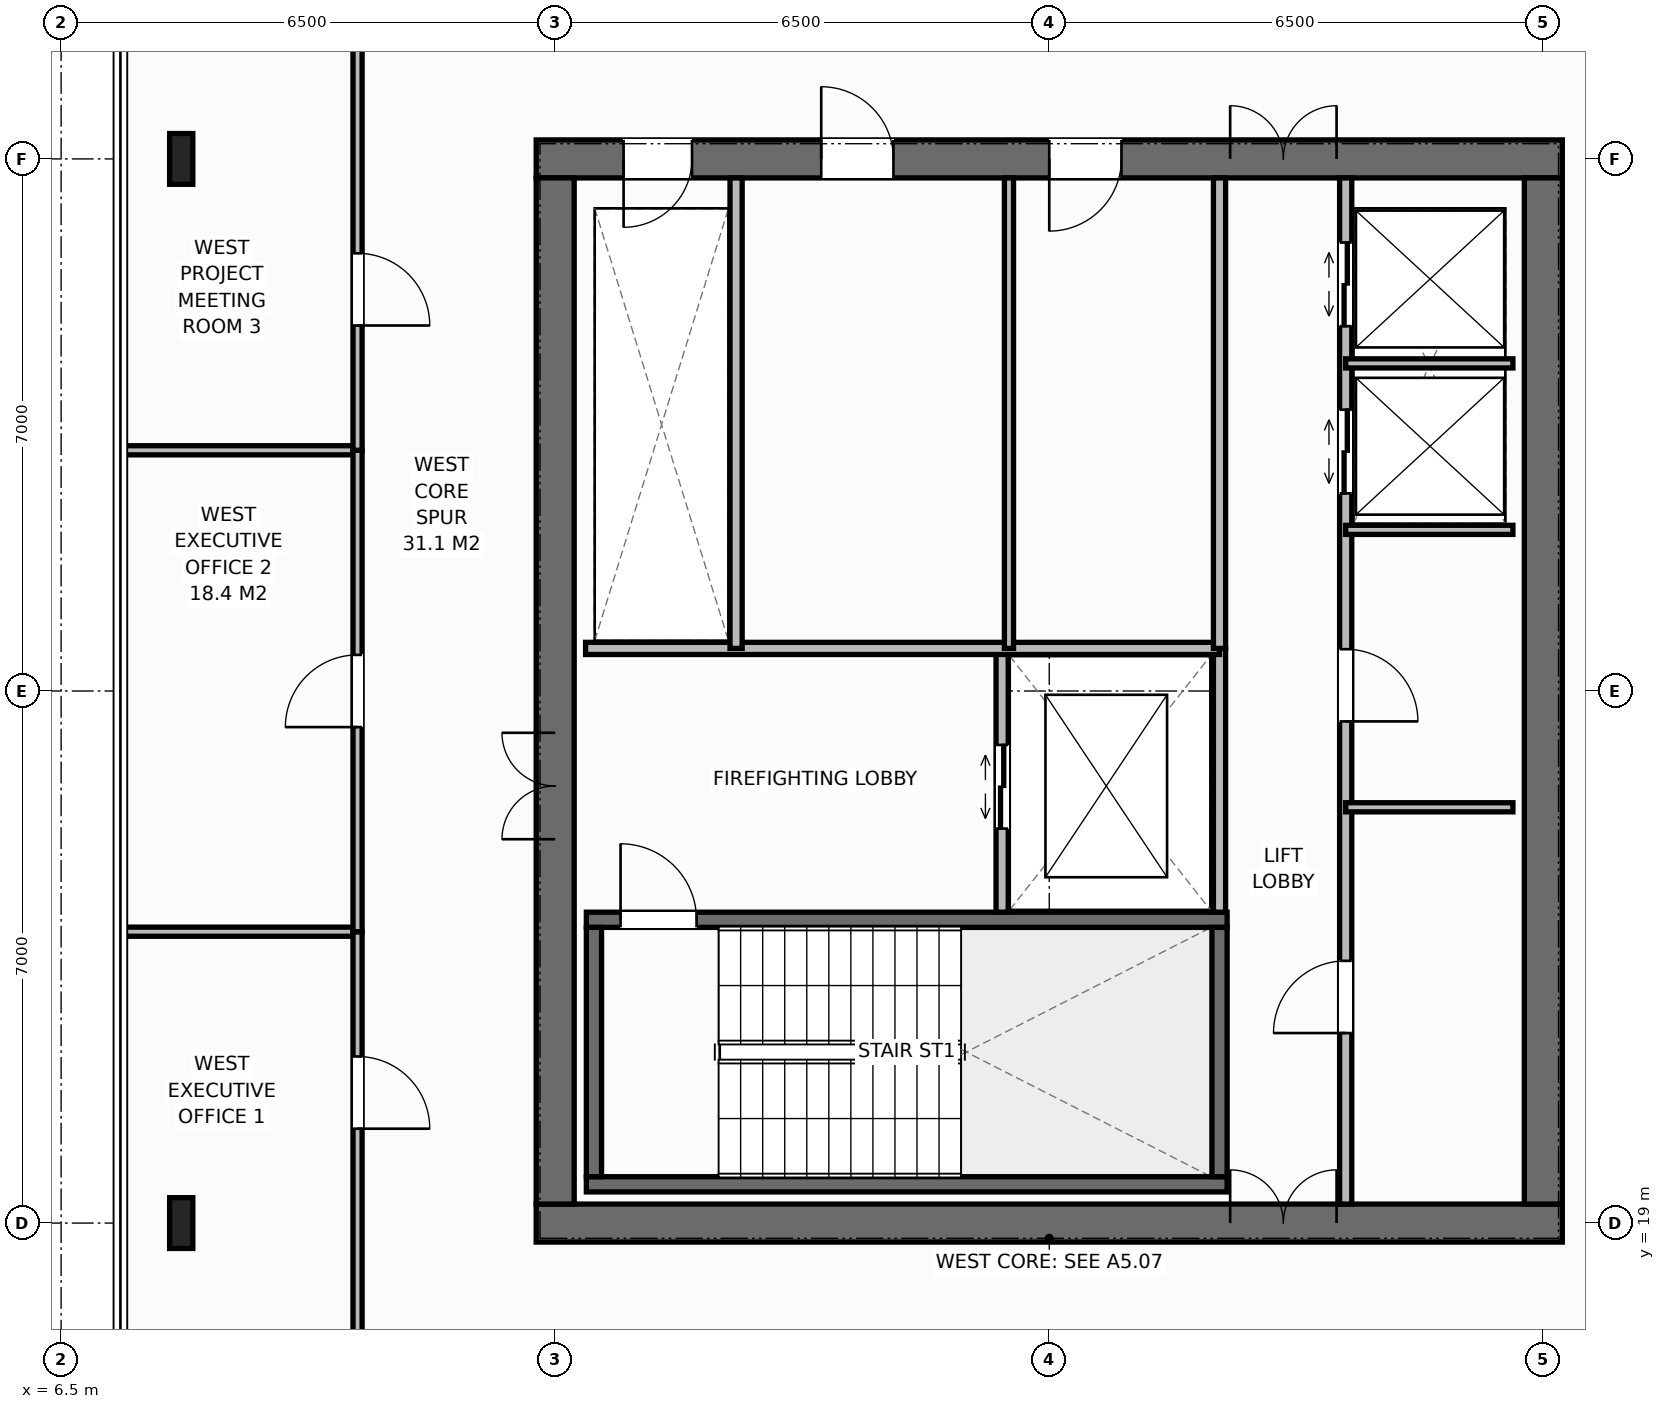
"""IFC4 building model, lengths in metres.
Left out: names, types, materials, properties, quantities, classifications, styles, units other than length and angle.
Written with IfcOpenShell. Run it as: python <this file> out.ifc"""

import sys

from ifc_helpers import new_model, si_unit, direction, frame, frame_2d, origin, origin_2d, place, context, subcontext, project, spatial, rectangle, i_section, extrude, element, fill, save


model = new_model("IFC4")
c1 = context("Model", 3, precision=1e-05, world=origin(), true_north=direction((0.0, 1.0)))
c2 = subcontext(c1, "Body", "Model", "MODEL_VIEW")
j1 = project(units=[si_unit("LENGTHUNIT", "METRE"), si_unit("PLANEANGLEUNIT", "RADIAN")], contexts=[c1])
p1 = place(None, origin())
s1 = spatial("IfcSite", under=j1, at=p1, CompositionType="ELEMENT")
p2 = place(p1, origin())
s2 = spatial("IfcBuilding", under=s1, at=p2, CompositionType="ELEMENT")
p3 = place(p2, frame((0.0, 0.0, 294.4)))
s3 = spatial("IfcBuildingStorey", under=s2, at=p3, CompositionType="ELEMENT", Elevation=294.4)
p4 = place(p3, frame((12.75, 19.0, 0.0), z_axis=(0.0, 0.0, 1.0), x_axis=(1.0, 0.0, 0.0)))
e1 = element("IfcWall", 1, at=p4, inside=s3, PredefinedType="SHEAR", context=c2, shape_type="SweptSolid", body=[
    extrude(rectangle(XDim=13.5, YDim=0.5, at=frame_2d((6.75, 0.0))), origin(), (0.0, 0.0, 1.0), 4.0),
])
p5 = place(p4, frame((9.13, 0.0, 0.0)))
e2 = element("IfcOpeningElement", 2, at=p5, cuts=e1, PredefinedType="OPENING", context=c2, shape_type="SweptSolid", body=[
    extrude(rectangle(XDim=1.4, YDim=2.2, at=frame_2d((0.7, 1.1))), frame((0.0, 0.26, 0.0), z_axis=(0.0, -1.0, 0.0), x_axis=(1.0, 0.0, 0.0)), (0.0, 0.0, 1.0), 0.52),
])
p6 = place(p3, frame((12.75, 33.0, 0.0), z_axis=(0.0, 0.0, 1.0), x_axis=(1.0, 0.0, 0.0)))
e3 = element("IfcWall", 3, at=p6, inside=s3, PredefinedType="SHEAR", context=c2, shape_type="SweptSolid", body=[
    extrude(rectangle(XDim=13.5, YDim=0.5, at=frame_2d((6.75, 0.0))), origin(), (0.0, 0.0, 1.0), 4.0),
])
p7 = place(p6, frame((1.15, 0.0, 0.0)))
e4 = element("IfcOpeningElement", 4, at=p7, cuts=e3, PredefinedType="OPENING", context=c2, shape_type="SweptSolid", body=[
    extrude(rectangle(XDim=0.9, YDim=2.15, at=frame_2d((0.45, 1.075))), frame((0.0, 0.26, 0.0), z_axis=(0.0, -1.0, 0.0), x_axis=(1.0, 0.0, 0.0)), (0.0, 0.0, 1.0), 0.52),
])
p8 = place(p6, frame((3.75, 0.0, 0.0)))
e5 = element("IfcOpeningElement", 5, at=p8, cuts=e3, PredefinedType="OPENING", context=c2, shape_type="SweptSolid", body=[
    extrude(rectangle(XDim=0.95, YDim=2.15, at=frame_2d((0.475, 1.075))), frame((0.0, 0.26, 0.0), z_axis=(0.0, -1.0, 0.0), x_axis=(1.0, 0.0, 0.0)), (0.0, 0.0, 1.0), 0.52),
])
p9 = place(p6, frame((6.75, 0.0, 0.0)))
e6 = element("IfcOpeningElement", 6, at=p9, cuts=e3, PredefinedType="OPENING", context=c2, shape_type="SweptSolid", body=[
    extrude(rectangle(XDim=0.95, YDim=2.15, at=frame_2d((0.475, 1.075))), frame((0.0, 0.26, 0.0), z_axis=(0.0, -1.0, 0.0), x_axis=(1.0, 0.0, 0.0)), (0.0, 0.0, 1.0), 0.52),
])
p10 = place(p6, frame((9.13, 0.0, 0.0)))
e7 = element("IfcOpeningElement", 7, at=p10, cuts=e3, PredefinedType="OPENING", context=c2, shape_type="SweptSolid", body=[
    extrude(rectangle(XDim=1.4, YDim=2.2, at=frame_2d((0.7, 1.1))), frame((0.0, 0.26, 0.0), z_axis=(0.0, -1.0, 0.0), x_axis=(1.0, 0.0, 0.0)), (0.0, 0.0, 1.0), 0.52),
])
p11 = place(p3, frame((13.0, 19.25, 0.0), z_axis=(0.0, 0.0, 1.0), x_axis=(0.0, 1.0, 0.0)))
e8 = element("IfcWall", 8, at=p11, inside=s3, PredefinedType="SHEAR", context=c2, shape_type="SweptSolid", body=[
    extrude(rectangle(XDim=13.5, YDim=0.5, at=frame_2d((6.75, 0.0))), origin(), (0.0, 0.0, 1.0), 4.0),
])
p12 = place(p11, frame((4.8, 0.0, 0.0)))
e9 = element("IfcOpeningElement", 9, at=p12, cuts=e8, PredefinedType="OPENING", context=c2, shape_type="SweptSolid", body=[
    extrude(rectangle(XDim=1.4, YDim=2.2, at=frame_2d((0.7, 1.1))), frame((0.0, 0.26, 0.0), z_axis=(0.0, -1.0, 0.0), x_axis=(1.0, 0.0, 0.0)), (0.0, 0.0, 1.0), 0.52),
])
p13 = place(p3, frame((26.0, 19.25, 0.0), z_axis=(0.0, 0.0, 1.0), x_axis=(0.0, 1.0, 0.0)))
e10 = element("IfcWall", 10, at=p13, inside=s3, PredefinedType="SHEAR", context=c2, shape_type="SweptSolid", body=[
    extrude(rectangle(XDim=13.5, YDim=0.5, at=frame_2d((6.75, 0.0))), origin(), (0.0, 0.0, 1.0), 4.0),
])
p14 = place(p3, frame((13.41, 19.51, 0.0), z_axis=(0.0, 0.0, 1.0), x_axis=(1.0, 0.0, 0.0)))
e11 = element("IfcWall", 11, at=p14, inside=s3, PredefinedType="SHEAR", context=c2, shape_type="SweptSolid", body=[
    extrude(rectangle(XDim=8.43, YDim=0.2, at=frame_2d((4.215, 0.0))), origin(), (0.0, 0.0, 1.0), 4.0),
])
p15 = place(p3, frame((13.41, 22.99, 0.0), z_axis=(0.0, 0.0, 1.0), x_axis=(1.0, 0.0, 0.0)))
e12 = element("IfcWall", 12, at=p15, inside=s3, PredefinedType="SHEAR", context=c2, shape_type="SweptSolid", body=[
    extrude(rectangle(XDim=8.43, YDim=0.2, at=frame_2d((4.215, 0.0))), origin(), (0.0, 0.0, 1.0), 4.0),
])
p16 = place(p15, frame((0.45, 0.0, 0.0)))
e13 = element("IfcOpeningElement", 13, at=p16, cuts=e12, PredefinedType="OPENING", context=c2, shape_type="SweptSolid", body=[
    extrude(rectangle(XDim=1.0, YDim=2.15, at=frame_2d((0.5, 1.075))), frame((0.0, 0.11, 0.0), z_axis=(0.0, -1.0, 0.0), x_axis=(1.0, 0.0, 0.0)), (0.0, 0.0, 1.0), 0.22),
])
for number, where, z_axis, x_axis in (
    (14, (13.51, 19.61, 0.0), (0.0, 0.0, 1.0), (0.0, 1.0, 0.0)),
    (15, (21.74, 19.61, 0.0), (0.0, 0.0, 1.0), (0.0, 1.0, 0.0)),
):
    element("IfcWall", number, at=place(p3, frame(where, z_axis=z_axis, x_axis=x_axis)), inside=s3, PredefinedType="SHEAR", context=c2, shape_type="SweptSolid", body=[
        extrude(rectangle(XDim=3.28, YDim=0.2, at=frame_2d((1.64, 0.0))), origin(), (0.0, 0.0, 1.0), 4.0),
    ])
for number, where, z_axis, x_axis in (
    (16, (8.08, 19.0, 0.0), (0.0, 0.0, 1.0), (1.0, 0.0, 0.0)),
    (17, (8.08, 33.0, 0.0), (0.0, 0.0, 1.0), (1.0, 0.0, 0.0)),
):
    element("IfcColumn", number, at=place(p3, frame(where, z_axis=z_axis, x_axis=x_axis)), inside=s3, PredefinedType="COLUMN", context=c2, shape_type="SweptSolid", body=[
        extrude(i_section(OverallWidth=0.305, OverallDepth=0.668, WebThickness=0.021, FlangeThickness=0.04, at=origin_2d()), origin(), (0.0, 0.0, 1.0), 4.0),
    ])
p17 = place(p3, frame((21.74, 23.09, 0.0), z_axis=(0.0, 0.0, 1.0), x_axis=(0.0, 1.0, 0.0)))
e18 = element("IfcWall", 18, at=p17, inside=s3, PredefinedType="STANDARD", context=c2, shape_type="SweptSolid", body=[
    extrude(rectangle(XDim=3.47, YDim=0.16, at=frame_2d((1.735, 0.0))), origin(), (0.0, 0.0, 1.0), 3.788),
])
p18 = place(p3, frame((18.88, 23.09, 0.0), z_axis=(0.0, 0.0, 1.0), x_axis=(0.0, 1.0, 0.0)))
e19 = element("IfcWall", 19, at=p18, inside=s3, PredefinedType="STANDARD", context=c2, shape_type="SweptSolid", body=[
    extrude(rectangle(XDim=3.47, YDim=0.16, at=frame_2d((1.735, 0.0))), origin(), (0.0, 0.0, 1.0), 3.788),
])
p19 = place(p18, frame((1.1, 0.0, 0.0)))
e20 = element("IfcOpeningElement", 20, at=p19, cuts=e19, PredefinedType="OPENING", context=c2, shape_type="SweptSolid", body=[
    extrude(rectangle(XDim=1.1, YDim=2.2, at=frame_2d((0.55, 1.1))), frame((0.0, 0.09, 0.0), z_axis=(0.0, -1.0, 0.0), x_axis=(1.0, 0.0, 0.0)), (0.0, 0.0, 1.0), 0.18),
])
p20 = place(p3, frame((13.4, 26.56, 0.0), z_axis=(0.0, 0.0, 1.0), x_axis=(1.0, 0.0, 0.0)))
e21 = element("IfcWall", 21, at=p20, inside=s3, PredefinedType="STANDARD", context=c2, shape_type="SweptSolid", body=[
    extrude(rectangle(XDim=8.34, YDim=0.16, at=frame_2d((4.17, 0.0))), origin(), (0.0, 0.0, 1.0), 3.788),
])
p21 = place(p3, frame((15.38, 26.56, 0.0), z_axis=(0.0, 0.0, 1.0), x_axis=(0.0, 1.0, 0.0)))
e22 = element("IfcWall", 22, at=p21, inside=s3, PredefinedType="STANDARD", context=c2, shape_type="SweptSolid", body=[
    extrude(rectangle(XDim=6.19, YDim=0.16, at=frame_2d((3.095, 0.0))), origin(), (0.0, 0.0, 1.0), 3.788),
])
p22 = place(p3, frame((18.97, 26.56, 0.0), z_axis=(0.0, 0.0, 1.0), x_axis=(0.0, 1.0, 0.0)))
e23 = element("IfcWall", 23, at=p22, inside=s3, PredefinedType="PARTITIONING", context=c2, shape_type="SweptSolid", body=[
    extrude(rectangle(XDim=6.19, YDim=0.12, at=frame_2d((3.095, 0.0))), origin(), (0.0, 0.0, 1.0), 3.788),
])
p23 = place(p3, frame((21.74, 26.56, 0.0), z_axis=(0.0, 0.0, 1.0), x_axis=(0.0, 1.0, 0.0)))
e24 = element("IfcWall", 24, at=p23, inside=s3, PredefinedType="STANDARD", context=c2, shape_type="SweptSolid", body=[
    extrude(rectangle(XDim=6.19, YDim=0.16, at=frame_2d((3.095, 0.0))), origin(), (0.0, 0.0, 1.0), 3.788),
])
p24 = place(p3, frame((23.4, 19.25, 0.0), z_axis=(0.0, 0.0, 1.0), x_axis=(0.0, 1.0, 0.0)))
e25 = element("IfcWall", 25, at=p24, inside=s3, PredefinedType="STANDARD", context=c2, shape_type="SweptSolid", body=[
    extrude(rectangle(XDim=13.5, YDim=0.16, at=frame_2d((6.75, 0.0))), origin(), (0.0, 0.0, 1.0), 3.788),
])
p25 = place(p24, frame((2.25, 0.0, 0.0)))
e26 = element("IfcOpeningElement", 26, at=p25, cuts=e25, PredefinedType="OPENING", context=c2, shape_type="SweptSolid", body=[
    extrude(rectangle(XDim=0.95, YDim=2.15, at=frame_2d((0.475, 1.075))), frame((0.0, 0.09, 0.0), z_axis=(0.0, -1.0, 0.0), x_axis=(1.0, 0.0, 0.0)), (0.0, 0.0, 1.0), 0.18),
])
p26 = place(p24, frame((6.35, 0.0, 0.0)))
e27 = element("IfcOpeningElement", 27, at=p26, cuts=e25, PredefinedType="OPENING", context=c2, shape_type="SweptSolid", body=[
    extrude(rectangle(XDim=0.95, YDim=2.15, at=frame_2d((0.475, 1.075))), frame((0.0, 0.09, 0.0), z_axis=(0.0, -1.0, 0.0), x_axis=(1.0, 0.0, 0.0)), (0.0, 0.0, 1.0), 0.18),
])
p27 = place(p24, frame((9.35, 0.0, 0.0)))
e28 = element("IfcOpeningElement", 28, at=p27, cuts=e25, PredefinedType="OPENING", context=c2, shape_type="SweptSolid", body=[
    extrude(rectangle(XDim=1.1, YDim=2.2, at=frame_2d((0.55, 1.1))), frame((0.0, 0.09, 0.0), z_axis=(0.0, -1.0, 0.0), x_axis=(1.0, 0.0, 0.0)), (0.0, 0.0, 1.0), 0.18),
])
p28 = place(p24, frame((11.55, 0.0, 0.0)))
e29 = element("IfcOpeningElement", 29, at=p28, cuts=e25, PredefinedType="OPENING", context=c2, shape_type="SweptSolid", body=[
    extrude(rectangle(XDim=1.1, YDim=2.2, at=frame_2d((0.55, 1.1))), frame((0.0, 0.09, 0.0), z_axis=(0.0, -1.0, 0.0), x_axis=(1.0, 0.0, 0.0)), (0.0, 0.0, 1.0), 0.18),
])
for number, where, z_axis, x_axis in (
    (30, (23.4, 24.47, 0.0), (0.0, 0.0, 1.0), (1.0, 0.0, 0.0)),
    (31, (23.4, 28.12, 0.0), (0.0, 0.0, 1.0), (1.0, 0.0, 0.0)),
    (32, (23.4, 30.31, 0.0), (0.0, 0.0, 1.0), (1.0, 0.0, 0.0)),
):
    element("IfcWall", number, at=place(p3, frame(where, z_axis=z_axis, x_axis=x_axis)), inside=s3, PredefinedType="PARTITIONING", context=c2, shape_type="SweptSolid", body=[
        extrude(rectangle(XDim=2.2, YDim=0.12, at=frame_2d((1.1, 0.0))), origin(), (0.0, 0.0, 1.0), 3.788),
    ])
p29 = place(p3, frame((7.22, 22.833, 0.0), z_axis=(0.0, 0.0, 1.0), x_axis=(1.0, 0.0, 0.0)))
e33 = element("IfcWall", 33, at=p29, inside=s3, PredefinedType="PARTITIONING", context=c2, shape_type="SweptSolid", body=[
    extrude(rectangle(XDim=3.18, YDim=0.12, at=frame_2d((1.59, 0.0))), origin(), (0.0, 0.0, 1.0), 3.788),
])
p30 = place(p3, frame((10.4, 16.5, 0.0), z_axis=(0.0, 0.0, 1.0), x_axis=(0.0, 1.0, 0.0)))
e34 = element("IfcWall", 34, at=p30, inside=s3, PredefinedType="PARTITIONING", context=c2, shape_type="SweptSolid", body=[
    extrude(rectangle(XDim=6.333, YDim=0.12, at=frame_2d((3.167, 0.0))), origin(), (0.0, 0.0, 1.0), 3.788),
])
p31 = place(p30, frame((3.742, 0.0, 0.0)))
e35 = element("IfcOpeningElement", 35, at=p31, cuts=e34, PredefinedType="OPENING", context=c2, shape_type="SweptSolid", body=[
    extrude(rectangle(XDim=0.95, YDim=2.15, at=frame_2d((0.475, 1.075))), frame((0.0, 0.07, 0.0), z_axis=(0.0, -1.0, 0.0), x_axis=(1.0, 0.0, 0.0)), (0.0, 0.0, 1.0), 0.14),
])
p32 = place(p3, frame((7.22, 29.167, 0.0), z_axis=(0.0, 0.0, 1.0), x_axis=(1.0, 0.0, 0.0)))
e36 = element("IfcWall", 36, at=p32, inside=s3, PredefinedType="PARTITIONING", context=c2, shape_type="SweptSolid", body=[
    extrude(rectangle(XDim=3.18, YDim=0.12, at=frame_2d((1.59, 0.0))), origin(), (0.0, 0.0, 1.0), 3.788),
])
p33 = place(p3, frame((10.4, 22.833, 0.0), z_axis=(0.0, 0.0, 1.0), x_axis=(0.0, 1.0, 0.0)))
e37 = element("IfcWall", 37, at=p33, inside=s3, PredefinedType="PARTITIONING", context=c2, shape_type="SweptSolid", body=[
    extrude(rectangle(XDim=6.333, YDim=0.12, at=frame_2d((3.167, 0.0))), origin(), (0.0, 0.0, 1.0), 3.788),
])
p34 = place(p33, frame((2.692, 0.0, 0.0)))
e38 = element("IfcOpeningElement", 38, at=p34, cuts=e37, PredefinedType="OPENING", context=c2, shape_type="SweptSolid", body=[
    extrude(rectangle(XDim=0.95, YDim=2.15, at=frame_2d((0.475, 1.075))), frame((0.0, 0.07, 0.0), z_axis=(0.0, -1.0, 0.0), x_axis=(1.0, 0.0, 0.0)), (0.0, 0.0, 1.0), 0.14),
])
p35 = place(p3, frame((10.4, 29.167, 0.0), z_axis=(0.0, 0.0, 1.0), x_axis=(0.0, 1.0, 0.0)))
e39 = element("IfcWall", 39, at=p35, inside=s3, PredefinedType="PARTITIONING", context=c2, shape_type="SweptSolid", body=[
    extrude(rectangle(XDim=6.333, YDim=0.12, at=frame_2d((3.167, 0.0))), origin(), (0.0, 0.0, 1.0), 3.788),
])
p36 = place(p35, frame((1.642, 0.0, 0.0)))
e40 = element("IfcOpeningElement", 40, at=p36, cuts=e39, PredefinedType="OPENING", context=c2, shape_type="SweptSolid", body=[
    extrude(rectangle(XDim=0.95, YDim=2.15, at=frame_2d((0.475, 1.075))), frame((0.0, 0.07, 0.0), z_axis=(0.0, -1.0, 0.0), x_axis=(1.0, 0.0, 0.0)), (0.0, 0.0, 1.0), 0.14),
])
p37 = place(p16, origin())
e41 = element("IfcDoor", 41, at=p37, inside=s3, OperationType="SINGLE_SWING_LEFT", PredefinedType="DOOR", context=c2, shape_type="SweptSolid", body=[
    extrude(rectangle(XDim=1.0, YDim=2.15, at=frame_2d((0.5, 1.075))), frame((0.0, 0.025, 0.0), z_axis=(0.0, -1.0, 0.0), x_axis=(1.0, 0.0, 0.0)), (0.0, 0.0, 1.0), 0.05),
])
fill(e13, e41)
p38 = place(p12, origin())
e42 = element("IfcDoor", 42, at=p38, inside=s3, OperationType="DOUBLE_DOOR_SINGLE_SWING", PredefinedType="DOOR", context=c2, shape_type="SweptSolid", body=[
    extrude(rectangle(XDim=1.4, YDim=2.2, at=frame_2d((0.7, 1.1))), frame((0.0, 0.025, 0.0), z_axis=(0.0, -1.0, 0.0), x_axis=(1.0, 0.0, 0.0)), (0.0, 0.0, 1.0), 0.05),
])
fill(e9, e42)
p39 = place(p19, origin())
e43 = element("IfcDoor", 43, at=p39, inside=s3, OperationType="DOUBLE_DOOR_SLIDING", PredefinedType="DOOR", context=c2, shape_type="SweptSolid", body=[
    extrude(rectangle(XDim=1.1, YDim=2.2, at=frame_2d((0.55, 1.1))), frame((0.0, 0.025, 0.0), z_axis=(0.0, -1.0, 0.0), x_axis=(1.0, 0.0, 0.0)), (0.0, 0.0, 1.0), 0.05),
])
fill(e20, e43)
p40 = place(p7, origin())
e44 = element("IfcDoor", 44, at=p40, inside=s3, OperationType="SINGLE_SWING_RIGHT", PredefinedType="DOOR", context=c2, shape_type="SweptSolid", body=[
    extrude(rectangle(XDim=0.9, YDim=2.15, at=frame_2d((0.45, 1.075))), frame((0.0, -0.025, 0.0), z_axis=(0.0, -1.0, 0.0), x_axis=(1.0, 0.0, 0.0)), (0.0, 0.0, 1.0), 0.05),
])
fill(e4, e44)
p41 = place(p8, origin())
e45 = element("IfcDoor", 45, at=p41, inside=s3, OperationType="SINGLE_SWING_LEFT", PredefinedType="DOOR", context=c2, shape_type="SweptSolid", body=[
    extrude(rectangle(XDim=0.95, YDim=2.15, at=frame_2d((0.475, 1.075))), frame((0.0, -0.025, 0.0), z_axis=(0.0, -1.0, 0.0), x_axis=(1.0, 0.0, 0.0)), (0.0, 0.0, 1.0), 0.05),
])
fill(e5, e45)
p42 = place(p9, origin())
e46 = element("IfcDoor", 46, at=p42, inside=s3, OperationType="SINGLE_SWING_RIGHT", PredefinedType="DOOR", context=c2, shape_type="SweptSolid", body=[
    extrude(rectangle(XDim=0.95, YDim=2.15, at=frame_2d((0.475, 1.075))), frame((0.0, -0.025, 0.0), z_axis=(0.0, -1.0, 0.0), x_axis=(1.0, 0.0, 0.0)), (0.0, 0.0, 1.0), 0.05),
])
fill(e6, e46)
p43 = place(p5, origin())
e47 = element("IfcDoor", 47, at=p43, inside=s3, OperationType="DOUBLE_DOOR_SINGLE_SWING", PredefinedType="DOOR", context=c2, shape_type="SweptSolid", body=[
    extrude(rectangle(XDim=1.4, YDim=2.2, at=frame_2d((0.7, 1.1))), frame((0.0, 0.075, 0.0), z_axis=(0.0, -1.0, 0.0), x_axis=(1.0, 0.0, 0.0)), (0.0, 0.0, 1.0), 0.05),
])
fill(e2, e47)
p44 = place(p10, origin())
e48 = element("IfcDoor", 48, at=p44, inside=s3, OperationType="DOUBLE_DOOR_SINGLE_SWING", PredefinedType="DOOR", context=c2, shape_type="SweptSolid", body=[
    extrude(rectangle(XDim=1.4, YDim=2.2, at=frame_2d((0.7, 1.1))), frame((0.0, -0.025, 0.0), z_axis=(0.0, -1.0, 0.0), x_axis=(1.0, 0.0, 0.0)), (0.0, 0.0, 1.0), 0.05),
])
fill(e7, e48)
p45 = place(p25, origin())
e49 = element("IfcDoor", 49, at=p45, inside=s3, OperationType="SINGLE_SWING_LEFT", PredefinedType="DOOR", context=c2, shape_type="SweptSolid", body=[
    extrude(rectangle(XDim=0.95, YDim=2.15, at=frame_2d((0.475, 1.075))), frame((0.0, 0.025, 0.0), z_axis=(0.0, -1.0, 0.0), x_axis=(1.0, 0.0, 0.0)), (0.0, 0.0, 1.0), 0.05),
])
fill(e26, e49)
p46 = place(p26, origin())
e50 = element("IfcDoor", 50, at=p46, inside=s3, OperationType="SINGLE_SWING_RIGHT", PredefinedType="DOOR", context=c2, shape_type="SweptSolid", body=[
    extrude(rectangle(XDim=0.95, YDim=2.15, at=frame_2d((0.475, 1.075))), frame((0.0, 0.025, 0.0), z_axis=(0.0, -1.0, 0.0), x_axis=(1.0, 0.0, 0.0)), (0.0, 0.0, 1.0), 0.05),
])
fill(e27, e50)
p47 = place(p27, origin())
e51 = element("IfcDoor", 51, at=p47, inside=s3, OperationType="DOUBLE_DOOR_SLIDING", PredefinedType="DOOR", context=c2, shape_type="SweptSolid", body=[
    extrude(rectangle(XDim=1.1, YDim=2.2, at=frame_2d((0.55, 1.1))), frame((0.0, 0.025, 0.0), z_axis=(0.0, -1.0, 0.0), x_axis=(1.0, 0.0, 0.0)), (0.0, 0.0, 1.0), 0.05),
])
fill(e28, e51)
p48 = place(p28, origin())
e52 = element("IfcDoor", 52, at=p48, inside=s3, OperationType="DOUBLE_DOOR_SLIDING", PredefinedType="DOOR", context=c2, shape_type="SweptSolid", body=[
    extrude(rectangle(XDim=1.1, YDim=2.2, at=frame_2d((0.55, 1.1))), frame((0.0, 0.025, 0.0), z_axis=(0.0, -1.0, 0.0), x_axis=(1.0, 0.0, 0.0)), (0.0, 0.0, 1.0), 0.05),
])
fill(e29, e52)
p49 = place(p31, origin())
e53 = element("IfcDoor", 53, at=p49, inside=s3, OperationType="SINGLE_SWING_RIGHT", PredefinedType="DOOR", context=c2, shape_type="SweptSolid", body=[
    extrude(rectangle(XDim=0.95, YDim=2.15, at=frame_2d((0.475, 1.075))), frame((0.0, 0.025, 0.0), z_axis=(0.0, -1.0, 0.0), x_axis=(1.0, 0.0, 0.0)), (0.0, 0.0, 1.0), 0.05),
])
fill(e35, e53)
p50 = place(p34, origin())
e54 = element("IfcDoor", 54, at=p50, inside=s3, OperationType="SINGLE_SWING_LEFT", PredefinedType="DOOR", context=c2, shape_type="SweptSolid", body=[
    extrude(rectangle(XDim=0.95, YDim=2.15, at=frame_2d((0.475, 1.075))), frame((0.0, 0.025, 0.0), z_axis=(0.0, -1.0, 0.0), x_axis=(1.0, 0.0, 0.0)), (0.0, 0.0, 1.0), 0.05),
])
fill(e38, e54)
p51 = place(p36, origin())
e55 = element("IfcDoor", 55, at=p51, inside=s3, OperationType="SINGLE_SWING_RIGHT", PredefinedType="DOOR", context=c2, shape_type="SweptSolid", body=[
    extrude(rectangle(XDim=0.95, YDim=2.15, at=frame_2d((0.475, 1.075))), frame((0.0, 0.025, 0.0), z_axis=(0.0, -1.0, 0.0), x_axis=(1.0, 0.0, 0.0)), (0.0, 0.0, 1.0), 0.05),
])
fill(e40, e55)
save(model, sys.argv[1])
